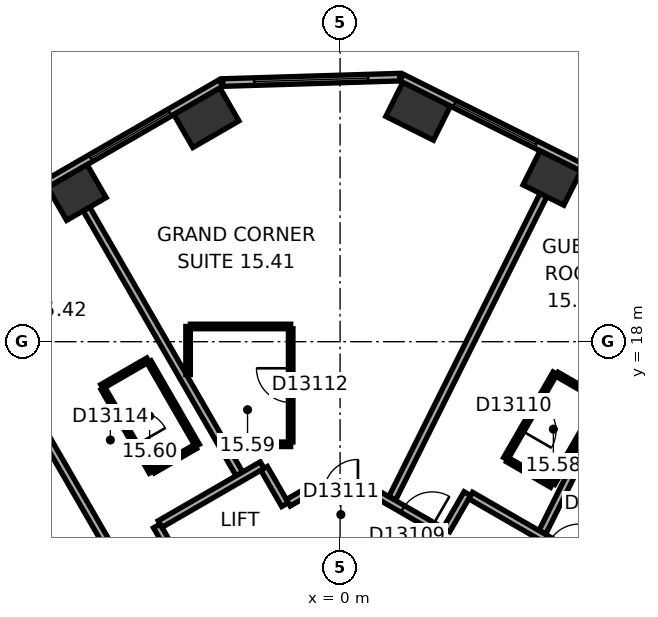
"""IFC4 building model, lengths in metres.
Left out: names, types, materials, properties, quantities, classifications, styles, units other than length and angle.
Written with IfcOpenShell. Run it as: python <this file> out.ifc"""

import sys

from ifc_helpers import new_model, si_unit, direction, frame, frame_2d, origin, origin_2d, place, context, subcontext, project, spatial, rectangle, extrude, element, fill, save


model = new_model("IFC4")
c1 = context("Model", 3, precision=1e-05, world=origin(), true_north=direction((0.0, 1.0)))
c2 = subcontext(c1, "Body", "Model", "MODEL_VIEW")
j1 = project(units=[si_unit("LENGTHUNIT", "METRE"), si_unit("PLANEANGLEUNIT", "RADIAN")], contexts=[c1])
p1 = place(None, origin())
s1 = spatial("IfcSite", under=j1, at=p1, CompositionType="ELEMENT")
p2 = place(p1, origin())
s2 = spatial("IfcBuilding", under=s1, at=p2, CompositionType="ELEMENT")
p3 = place(p2, frame((0.0, 0.0, 70.4)))
s3 = spatial("IfcBuildingStorey", under=s2, at=p3, CompositionType="ELEMENT", Elevation=70.4)
p4 = place(p3, frame((5.574, 22.306, 0.0), z_axis=(0.0, 0.0, 1.0), x_axis=(-0.894934361602, 0.44619781311, 0.0)))
e1 = element("IfcColumn", 1, at=p4, inside=s3, PredefinedType="COLUMN", context=c2, shape_type="SweptSolid", body=[
    extrude(rectangle(XDim=1.2, YDim=1.0, at=origin_2d()), origin(), (0.0, 0.0, 1.0), 3.3),
])
for number, where, z_axis, x_axis in (
    (2, (2.053, 24.062, 0.0), (0.0, 0.0, 1.0), (-0.895, 0.446, 0.0)),
    (3, (-3.518, 23.892, 0.0), (0.0, 0.0, 1.0), (-0.866, -0.5, 0.0)),
):
    element("IfcColumn", number, at=place(p3, frame(where, z_axis=z_axis, x_axis=x_axis)), inside=s3, PredefinedType="COLUMN", context=c2, shape_type="SweptSolid", body=[
        extrude(rectangle(XDim=1.4, YDim=1.0, at=origin_2d()), origin(), (0.0, 0.0, 1.0), 3.3),
    ])
p5 = place(p3, frame((-6.926, 21.925, 0.0), z_axis=(0.0, 0.0, 1.0), x_axis=(-0.866025403784, -0.5, 0.0)))
e4 = element("IfcColumn", 4, at=p5, inside=s3, PredefinedType="COLUMN", context=c2, shape_type="SweptSolid", body=[
    extrude(rectangle(XDim=1.2, YDim=1.0, at=origin_2d()), origin(), (0.0, 0.0, 1.0), 3.3),
])
p6 = place(p3, frame((20.63, 15.47, 0.0), z_axis=(0.0, 0.0, 1.0), x_axis=(-0.894934518609, 0.446197498203, 0.0)))
e5 = element("IfcWall", 5, at=p6, inside=s3, PredefinedType="STANDARD", context=c2, shape_type="SweptSolid", body=[
    extrude(rectangle(XDim=21.246, YDim=0.2, at=frame_2d((10.623, 0.0))), origin(), (0.0, 0.0, 1.0), 3.3),
])
p7 = place(p6, frame((1.553, 0.0, 0.8)))
e6 = element("IfcOpeningElement", 6, at=p7, cuts=e5, PredefinedType="OPENING", context=c2, shape_type="SweptSolid", body=[
    extrude(rectangle(XDim=2.4, YDim=1.7, at=frame_2d((1.2, 0.85))), frame((0.0, 0.11, 0.0), z_axis=(0.0, -1.0, 0.0), x_axis=(1.0, 0.0, 0.0)), (0.0, 0.0, 1.0), 0.22),
])
p8 = place(p6, frame((5.488, 0.0, 0.8)))
e7 = element("IfcOpeningElement", 7, at=p8, cuts=e5, PredefinedType="OPENING", context=c2, shape_type="SweptSolid", body=[
    extrude(rectangle(XDim=2.4, YDim=1.7, at=frame_2d((1.2, 0.85))), frame((0.0, 0.11, 0.0), z_axis=(0.0, -1.0, 0.0), x_axis=(1.0, 0.0, 0.0)), (0.0, 0.0, 1.0), 0.22),
])
p9 = place(p6, frame((9.422, 0.0, 0.8)))
e8 = element("IfcOpeningElement", 8, at=p9, cuts=e5, PredefinedType="OPENING", context=c2, shape_type="SweptSolid", body=[
    extrude(rectangle(XDim=2.4, YDim=1.7, at=frame_2d((1.2, 0.85))), frame((0.0, 0.11, 0.0), z_axis=(0.0, -1.0, 0.0), x_axis=(1.0, 0.0, 0.0)), (0.0, 0.0, 1.0), 0.22),
])
p10 = place(p6, frame((13.357, 0.0, 0.8)))
e9 = element("IfcOpeningElement", 9, at=p10, cuts=e5, PredefinedType="OPENING", context=c2, shape_type="SweptSolid", body=[
    extrude(rectangle(XDim=2.4, YDim=1.7, at=frame_2d((1.2, 0.85))), frame((0.0, 0.11, 0.0), z_axis=(0.0, -1.0, 0.0), x_axis=(1.0, 0.0, 0.0)), (0.0, 0.0, 1.0), 0.22),
])
p11 = place(p6, frame((17.292, 0.0, 0.8)))
e10 = element("IfcOpeningElement", 10, at=p11, cuts=e5, PredefinedType="OPENING", context=c2, shape_type="SweptSolid", body=[
    extrude(rectangle(XDim=2.4, YDim=1.7, at=frame_2d((1.2, 0.85))), frame((0.0, 0.11, 0.0), z_axis=(0.0, -1.0, 0.0), x_axis=(1.0, 0.0, 0.0)), (0.0, 0.0, 1.0), 0.22),
])
p12 = place(p3, frame((1.568, 24.961, 0.0), z_axis=(0.0, 0.0, 1.0), x_axis=(-0.999533359013, -0.030546099927, 0.0)))
e11 = element("IfcWall", 11, at=p12, inside=s3, PredefinedType="STANDARD", context=c2, shape_type="SweptSolid", body=[
    extrude(rectangle(XDim=4.66, YDim=0.2, at=frame_2d((2.33, 0.0))), origin(), (0.0, 0.0, 1.0), 3.3),
])
p13 = place(p12, frame((0.83, 0.0, 0.8)))
e12 = element("IfcOpeningElement", 12, at=p13, cuts=e11, PredefinedType="OPENING", context=c2, shape_type="SweptSolid", body=[
    extrude(rectangle(XDim=3.0, YDim=1.7, at=frame_2d((1.5, 0.85))), frame((0.0, 0.11, 0.0), z_axis=(0.0, -1.0, 0.0), x_axis=(1.0, 0.0, 0.0)), (0.0, 0.0, 1.0), 0.22),
])
p14 = place(p3, frame((-3.136, 24.805, 0.0), z_axis=(0.0, 0.0, 1.0), x_axis=(-0.866028291626, -0.499994998079, 0.0)))
e13 = element("IfcWall", 13, at=p14, inside=s3, PredefinedType="STANDARD", context=c2, shape_type="SweptSolid", body=[
    extrude(rectangle(XDim=21.246, YDim=0.2, at=frame_2d((10.623, 0.0))), origin(), (0.0, 0.0, 1.0), 3.3),
])
p15 = place(p14, frame((1.555, 0.0, 0.8)))
e14 = element("IfcOpeningElement", 14, at=p15, cuts=e13, PredefinedType="OPENING", context=c2, shape_type="SweptSolid", body=[
    extrude(rectangle(XDim=2.4, YDim=1.7, at=frame_2d((1.2, 0.85))), frame((0.0, 0.11, 0.0), z_axis=(0.0, -1.0, 0.0), x_axis=(1.0, 0.0, 0.0)), (0.0, 0.0, 1.0), 0.22),
])
p16 = place(p14, frame((5.489, 0.0, 0.8)))
e15 = element("IfcOpeningElement", 15, at=p16, cuts=e13, PredefinedType="OPENING", context=c2, shape_type="SweptSolid", body=[
    extrude(rectangle(XDim=2.4, YDim=1.7, at=frame_2d((1.2, 0.85))), frame((0.0, 0.11, 0.0), z_axis=(0.0, -1.0, 0.0), x_axis=(1.0, 0.0, 0.0)), (0.0, 0.0, 1.0), 0.22),
])
p17 = place(p14, frame((9.424, 0.0, 0.8)))
e16 = element("IfcOpeningElement", 16, at=p17, cuts=e13, PredefinedType="OPENING", context=c2, shape_type="SweptSolid", body=[
    extrude(rectangle(XDim=2.4, YDim=1.7, at=frame_2d((1.2, 0.85))), frame((0.0, 0.11, 0.0), z_axis=(0.0, -1.0, 0.0), x_axis=(1.0, 0.0, 0.0)), (0.0, 0.0, 1.0), 0.22),
])
p18 = place(p14, frame((13.358, 0.0, 0.8)))
e17 = element("IfcOpeningElement", 17, at=p18, cuts=e13, PredefinedType="OPENING", context=c2, shape_type="SweptSolid", body=[
    extrude(rectangle(XDim=2.4, YDim=1.7, at=frame_2d((1.2, 0.85))), frame((0.0, 0.11, 0.0), z_axis=(0.0, -1.0, 0.0), x_axis=(1.0, 0.0, 0.0)), (0.0, 0.0, 1.0), 0.22),
])
p19 = place(p14, frame((17.293, 0.0, 0.8)))
e18 = element("IfcOpeningElement", 18, at=p19, cuts=e13, PredefinedType="OPENING", context=c2, shape_type="SweptSolid", body=[
    extrude(rectangle(XDim=2.4, YDim=1.7, at=frame_2d((1.2, 0.85))), frame((0.0, 0.11, 0.0), z_axis=(0.0, -1.0, 0.0), x_axis=(1.0, 0.0, 0.0)), (0.0, 0.0, 1.0), 0.22),
])
p20 = place(p3, frame((-10.083, 19.524, 0.0), z_axis=(0.0, 0.0, 1.0), x_axis=(0.499999662836, -0.866025598446, 0.0)))
e19 = element("IfcWall", 19, at=p20, inside=s3, PredefinedType="PARTITIONING", context=c2, shape_type="SweptSolid", body=[
    extrude(rectangle(XDim=9.25, YDim=0.2, at=frame_2d((4.625, 0.0))), origin(), (0.0, 0.0, 1.0), 2.6),
])
p21 = place(p3, frame((-6.676, 21.492, 0.0), z_axis=(0.0, 0.0, 1.0), x_axis=(0.500011263043, -0.866018900966, 0.0)))
e20 = element("IfcWall", 20, at=p21, inside=s3, PredefinedType="PARTITIONING", context=c2, shape_type="SweptSolid", body=[
    extrude(rectangle(XDim=8.049, YDim=0.2, at=frame_2d((4.024, 0.0))), origin(), (0.0, 0.0, 1.0), 3.05),
])
p22 = place(p3, frame((-6.268, 16.82, 0.0), z_axis=(0.0, 0.0, 1.0), x_axis=(0.866002662425, 0.500039387122, 0.0)))
e21 = element("IfcWall", 21, at=p22, inside=s3, PredefinedType="PARTITIONING", context=c2, shape_type="SweptSolid", body=[
    extrude(rectangle(XDim=1.4, YDim=0.12, at=frame_2d((0.7, 0.0))), origin(), (0.0, 0.0, 1.0), 3.05),
])
p23 = place(p3, frame((-5.026, 17.469, 0.0), z_axis=(0.0, 0.0, 1.0), x_axis=(0.500005339912, -0.866022320763, 0.0)))
e22 = element("IfcWall", 22, at=p23, inside=s3, PredefinedType="PARTITIONING", context=c2, shape_type="SweptSolid", body=[
    extrude(rectangle(XDim=2.54, YDim=0.12, at=frame_2d((1.27, 0.0))), origin(), (0.0, 0.0, 1.0), 3.05),
])
p24 = place(p3, frame((-4.968, 14.569, 0.0), z_axis=(0.0, 0.0, 1.0), x_axis=(-0.500046963369, 0.865998287773, 0.0)))
e23 = element("IfcWall", 23, at=p24, inside=s3, PredefinedType="PARTITIONING", context=c2, shape_type="SweptSolid", body=[
    extrude(rectangle(XDim=2.54, YDim=0.12, at=frame_2d((1.27, 0.0))), origin(), (0.0, 0.0, 1.0), 3.05),
])
p25 = place(p24, frame((0.82, 0.0, 0.0)))
e24 = element("IfcOpeningElement", 24, at=p25, cuts=e23, PredefinedType="OPENING", context=c2, shape_type="SweptSolid", body=[
    extrude(rectangle(XDim=0.9, YDim=2.1, at=frame_2d((0.45, 1.05))), frame((0.0, 0.07, 0.0), z_axis=(0.0, -1.0, 0.0), x_axis=(1.0, 0.0, 0.0)), (0.0, 0.0, 1.0), 0.14),
])
p26 = place(p3, frame((-4.823, 13.152, 0.0), z_axis=(0.0, 0.0, 1.0), x_axis=(0.499986357472, -0.866033280158, 0.0)))
e25 = element("IfcWall", 25, at=p26, inside=s3, PredefinedType="PARTITIONING", context=c2, shape_type="SweptSolid", body=[
    extrude(rectangle(XDim=1.201, YDim=0.2, at=frame_2d((0.601, 0.0))), origin(), (0.0, 0.0, 1.0), 3.05),
])
p27 = place(p3, frame((-4.0, 17.137, 0.0), z_axis=(0.0, 0.0, 1.0), x_axis=(0.0, 1.0, 0.0)))
e26 = element("IfcWall", 26, at=p27, inside=s3, PredefinedType="PARTITIONING", context=c2, shape_type="SweptSolid", body=[
    extrude(rectangle(XDim=1.263, YDim=0.12, at=frame_2d((0.632, 0.0))), origin(), (0.0, 0.0, 1.0), 3.05),
])
p28 = place(p3, frame((-3.94, 18.401, 0.0), z_axis=(0.0, 0.0, 1.0), x_axis=(1.0, 0.0, 0.0)))
e27 = element("IfcWall", 27, at=p28, inside=s3, PredefinedType="PARTITIONING", context=c2, shape_type="SweptSolid", body=[
    extrude(rectangle(XDim=2.64, YDim=0.12, at=frame_2d((1.32, 0.0))), origin(), (0.0, 0.0, 1.0), 3.05),
])
p29 = place(p3, frame((-3.808, 15.239, 0.0), z_axis=(0.0, 0.0, 1.0), x_axis=(-0.866087136806, -0.499893060024, 0.0)))
e28 = element("IfcWall", 28, at=p29, inside=s3, PredefinedType="PARTITIONING", context=c2, shape_type="SweptSolid", body=[
    extrude(rectangle(XDim=1.28, YDim=0.12, at=frame_2d((0.64, 0.0))), origin(), (0.0, 0.0, 1.0), 3.05),
])
p30 = place(p3, frame((-2.05, 14.752, 0.0), z_axis=(0.0, 0.0, 1.0), x_axis=(-0.866030936828, -0.499990416364, 0.0)))
e29 = element("IfcWall", 29, at=p30, inside=s3, PredefinedType="PARTITIONING", context=c2, shape_type="SweptSolid", body=[
    extrude(rectangle(XDim=3.102, YDim=0.2, at=frame_2d((1.551, 0.0))), origin(), (0.0, 0.0, 1.0), 3.05),
])
p31 = place(p3, frame((-1.449, 13.712, 0.0), z_axis=(0.0, 0.0, 1.0), x_axis=(-0.499978356969, 0.866037899034, 0.0)))
e30 = element("IfcWall", 30, at=p31, inside=s3, PredefinedType="PARTITIONING", context=c2, shape_type="SweptSolid", body=[
    extrude(rectangle(XDim=1.101, YDim=0.2, at=frame_2d((0.551, 0.0))), origin(), (0.0, 0.0, 1.0), 3.05),
])
p32 = place(p3, frame((-1.3, 15.301, 0.0), z_axis=(0.0, 0.0, 1.0), x_axis=(-1.0, 0.0, 0.0)))
e31 = element("IfcWall", 31, at=p32, inside=s3, PredefinedType="PARTITIONING", context=c2, shape_type="SweptSolid", body=[
    extrude(rectangle(XDim=1.661, YDim=0.12, at=frame_2d((0.831, 0.0))), origin(), (0.0, 0.0, 1.0), 3.05),
])
p33 = place(p3, frame((-1.3, 18.341, 0.0), z_axis=(0.0, 0.0, 1.0), x_axis=(0.0, -1.0, 0.0)))
e32 = element("IfcWall", 32, at=p33, inside=s3, PredefinedType="PARTITIONING", context=c2, shape_type="SweptSolid", body=[
    extrude(rectangle(XDim=2.98, YDim=0.12, at=frame_2d((1.49, 0.0))), origin(), (0.0, 0.0, 1.0), 3.05),
])
p34 = place(p33, frame((1.04, 0.0, 0.0)))
e33 = element("IfcOpeningElement", 33, at=p34, cuts=e32, PredefinedType="OPENING", context=c2, shape_type="SweptSolid", body=[
    extrude(rectangle(XDim=0.9, YDim=2.1, at=frame_2d((0.45, 1.05))), frame((0.0, 0.07, 0.0), z_axis=(0.0, -1.0, 0.0), x_axis=(1.0, 0.0, 0.0)), (0.0, 0.0, 1.0), 0.14),
])
p35 = place(p3, frame((-0.95, 14.001, 0.0), z_axis=(0.0, 0.0, 1.0), x_axis=(-0.86609177584, -0.499885022602, 0.0)))
e34 = element("IfcWall", 34, at=p35, inside=s3, PredefinedType="PARTITIONING", context=c2, shape_type="SweptSolid", body=[
    extrude(rectangle(XDim=0.477, YDim=0.2, at=frame_2d((0.238, 0.0))), origin(), (0.0, 0.0, 1.0), 3.05),
])
p36 = place(p3, frame((0.95, 14.001, 0.0), z_axis=(0.0, 0.0, 1.0), x_axis=(-1.0, 0.0, 0.0)))
e35 = element("IfcWall", 35, at=p36, inside=s3, PredefinedType="PARTITIONING", context=c2, shape_type="SweptSolid", body=[
    extrude(rectangle(XDim=1.86, YDim=0.2, at=frame_2d((0.93, 0.0))), origin(), (0.0, 0.0, 1.0), 3.05),
])
p37 = place(p36, frame((0.48, 0.0, 0.0)))
e36 = element("IfcOpeningElement", 36, at=p37, cuts=e35, PredefinedType="OPENING", context=c2, shape_type="SweptSolid", body=[
    extrude(rectangle(XDim=0.9, YDim=2.1, at=frame_2d((0.45, 1.05))), frame((0.0, 0.11, 0.0), z_axis=(0.0, -1.0, 0.0), x_axis=(1.0, 0.0, 0.0)), (0.0, 0.0, 1.0), 0.22),
])
p38 = place(p3, frame((2.748, 12.962, 0.0), z_axis=(0.0, 0.0, 1.0), x_axis=(-0.866013897511, 0.50001992892, 0.0)))
e37 = element("IfcWall", 37, at=p38, inside=s3, PredefinedType="PARTITIONING", context=c2, shape_type="SweptSolid", body=[
    extrude(rectangle(XDim=2.037, YDim=0.2, at=frame_2d((1.018, 0.0))), origin(), (0.0, 0.0, 1.0), 3.05),
])
p39 = place(p38, frame((0.372, 0.0, 0.0)))
e38 = element("IfcOpeningElement", 38, at=p39, cuts=e37, PredefinedType="OPENING", context=c2, shape_type="SweptSolid", body=[
    extrude(rectangle(XDim=0.9, YDim=2.1, at=frame_2d((0.45, 1.05))), frame((0.0, 0.11, 0.0), z_axis=(0.0, -1.0, 0.0), x_axis=(1.0, 0.0, 0.0)), (0.0, 0.0, 1.0), 0.22),
])
p40 = place(p3, frame((3.349, 14.002, 0.0), z_axis=(0.0, 0.0, 1.0), x_axis=(-0.500074377092, -0.865982457891, 0.0)))
e39 = element("IfcWall", 39, at=p40, inside=s3, PredefinedType="PARTITIONING", context=c2, shape_type="SweptSolid", body=[
    extrude(rectangle(XDim=1.101, YDim=0.2, at=frame_2d((0.55, 0.0))), origin(), (0.0, 0.0, 1.0), 3.05),
])
p41 = place(p3, frame((4.356, 14.922, 0.0), z_axis=(0.0, 0.0, 1.0), x_axis=(0.499936506574, 0.866062058628, 0.0)))
e40 = element("IfcWall", 40, at=p41, inside=s3, PredefinedType="PARTITIONING", context=c2, shape_type="SweptSolid", body=[
    extrude(rectangle(XDim=2.6, YDim=0.12, at=frame_2d((1.3, 0.0))), origin(), (0.0, 0.0, 1.0), 3.05),
])
p42 = place(p41, frame((0.85, 0.0, 0.0)))
e41 = element("IfcOpeningElement", 41, at=p42, cuts=e40, PredefinedType="OPENING", context=c2, shape_type="SweptSolid", body=[
    extrude(rectangle(XDim=0.9, YDim=2.1, at=frame_2d((0.45, 1.05))), frame((0.0, 0.07, 0.0), z_axis=(0.0, -1.0, 0.0), x_axis=(1.0, 0.0, 0.0)), (0.0, 0.0, 1.0), 0.14),
])
p43 = place(p3, frame((5.351, 21.859, 0.0), z_axis=(0.0, 0.0, 1.0), x_axis=(-0.446205309328, -0.894930624086, 0.0)))
e42 = element("IfcWall", 42, at=p43, inside=s3, PredefinedType="PARTITIONING", context=c2, shape_type="SweptSolid", body=[
    extrude(rectangle(XDim=8.913, YDim=0.2, at=frame_2d((4.457, 0.0))), origin(), (0.0, 0.0, 1.0), 2.6),
])
p44 = place(p3, frame((5.569, 14.222, 0.0), z_axis=(0.0, 0.0, 1.0), x_axis=(-0.866036909293, 0.499980071345, 0.0)))
e43 = element("IfcWall", 43, at=p44, inside=s3, PredefinedType="PARTITIONING", context=c2, shape_type="SweptSolid", body=[
    extrude(rectangle(XDim=1.34, YDim=0.12, at=frame_2d((0.67, 0.0))), origin(), (0.0, 0.0, 1.0), 3.05),
])
p45 = place(p3, frame((5.708, 17.144, 0.0), z_axis=(0.0, 0.0, 1.0), x_axis=(0.866082447003, -0.499901185229, 0.0)))
e44 = element("IfcWall", 44, at=p45, inside=s3, PredefinedType="PARTITIONING", context=c2, shape_type="SweptSolid", body=[
    extrude(rectangle(XDim=1.34, YDim=0.12, at=frame_2d((0.67, 0.0))), origin(), (0.0, 0.0, 1.0), 3.05),
])
p46 = place(p3, frame((6.839, 16.422, 0.0), z_axis=(0.0, 0.0, 1.0), x_axis=(-0.50000366821, -0.866023285932, 0.0)))
e45 = element("IfcWall", 45, at=p46, inside=s3, PredefinedType="PARTITIONING", context=c2, shape_type="SweptSolid", body=[
    extrude(rectangle(XDim=2.48, YDim=0.12, at=frame_2d((1.24, 0.0))), origin(), (0.0, 0.0, 1.0), 3.05),
])
p47 = place(p3, frame((8.872, 20.104, 0.0), z_axis=(0.0, 0.0, 1.0), x_axis=(-0.446218378653, -0.894924107706, 0.0)))
e46 = element("IfcWall", 46, at=p47, inside=s3, PredefinedType="PARTITIONING", context=c2, shape_type="SweptSolid", body=[
    extrude(rectangle(XDim=7.95, YDim=0.2, at=frame_2d((3.975, 0.0))), origin(), (0.0, 0.0, 1.0), 3.05),
])
p48 = place(p3, frame((10.885, 9.652, 0.0), z_axis=(0.0, 0.0, 1.0), x_axis=(-0.866033868542, 0.499985338323, 0.0)))
e47 = element("IfcWall", 47, at=p48, inside=s3, PredefinedType="PARTITIONING", context=c2, shape_type="SweptSolid", body=[
    extrude(rectangle(XDim=8.602, YDim=0.2, at=frame_2d((4.301, 0.0))), origin(), (0.0, 0.0, 1.0), 3.05),
])
p49 = place(p48, frame((5.302, 0.0, 0.0)))
e48 = element("IfcOpeningElement", 48, at=p49, cuts=e47, PredefinedType="OPENING", context=c2, shape_type="SweptSolid", body=[
    extrude(rectangle(XDim=0.9, YDim=2.1, at=frame_2d((0.45, 1.05))), frame((0.0, 0.11, 0.0), z_axis=(0.0, -1.0, 0.0), x_axis=(1.0, 0.0, 0.0)), (0.0, 0.0, 1.0), 0.22),
])
p50 = place(p11, origin())
e49 = element("IfcWindow", 49, at=p50, inside=s3, PartitioningType="SINGLE_PANEL", PredefinedType="WINDOW", context=c2, shape_type="SweptSolid", body=[
    extrude(rectangle(XDim=2.4, YDim=1.7, at=frame_2d((1.2, 0.85))), frame((0.0, 0.03, 0.0), z_axis=(0.0, -1.0, 0.0), x_axis=(1.0, 0.0, 0.0)), (0.0, 0.0, 1.0), 0.06),
])
fill(e10, e49)
p51 = place(p13, origin())
e50 = element("IfcWindow", 50, at=p51, inside=s3, PartitioningType="SINGLE_PANEL", PredefinedType="WINDOW", context=c2, shape_type="SweptSolid", body=[
    extrude(rectangle(XDim=3.0, YDim=1.7, at=frame_2d((1.5, 0.85))), frame((0.0, 0.03, 0.0), z_axis=(0.0, -1.0, 0.0), x_axis=(1.0, 0.0, 0.0)), (0.0, 0.0, 1.0), 0.06),
])
fill(e12, e50)
p52 = place(p15, origin())
e51 = element("IfcWindow", 51, at=p52, inside=s3, PartitioningType="SINGLE_PANEL", PredefinedType="WINDOW", context=c2, shape_type="SweptSolid", body=[
    extrude(rectangle(XDim=2.4, YDim=1.7, at=frame_2d((1.2, 0.85))), frame((0.0, 0.03, 0.0), z_axis=(0.0, -1.0, 0.0), x_axis=(1.0, 0.0, 0.0)), (0.0, 0.0, 1.0), 0.06),
])
fill(e14, e51)
p53 = place(p39, origin())
e52 = element("IfcDoor", 52, at=p53, inside=s3, OperationType="SINGLE_SWING_LEFT", PredefinedType="DOOR", context=c2, shape_type="SweptSolid", body=[
    extrude(rectangle(XDim=0.9, YDim=2.1, at=frame_2d((0.45, 1.05))), frame((0.0, 0.025, 0.0), z_axis=(0.0, -1.0, 0.0), x_axis=(1.0, 0.0, 0.0)), (0.0, 0.0, 1.0), 0.05),
])
fill(e38, e52)
p54 = place(p42, origin())
e53 = element("IfcDoor", 53, at=p54, inside=s3, OperationType="SINGLE_SWING_LEFT", PredefinedType="DOOR", context=c2, shape_type="SweptSolid", body=[
    extrude(rectangle(XDim=0.9, YDim=2.1, at=frame_2d((0.45, 1.05))), frame((0.0, 0.025, 0.0), z_axis=(0.0, -1.0, 0.0), x_axis=(1.0, 0.0, 0.0)), (0.0, 0.0, 1.0), 0.05),
])
fill(e41, e53)
p55 = place(p37, origin())
e54 = element("IfcDoor", 54, at=p55, inside=s3, OperationType="SINGLE_SWING_LEFT", PredefinedType="DOOR", context=c2, shape_type="SweptSolid", body=[
    extrude(rectangle(XDim=0.9, YDim=2.1, at=frame_2d((0.45, 1.05))), frame((0.0, 0.025, 0.0), z_axis=(0.0, -1.0, 0.0), x_axis=(1.0, 0.0, 0.0)), (0.0, 0.0, 1.0), 0.05),
])
fill(e36, e54)
p56 = place(p34, origin())
e55 = element("IfcDoor", 55, at=p56, inside=s3, OperationType="SINGLE_SWING_LEFT", PredefinedType="DOOR", context=c2, shape_type="SweptSolid", body=[
    extrude(rectangle(XDim=0.9, YDim=2.1, at=frame_2d((0.45, 1.05))), frame((0.0, 0.025, 0.0), z_axis=(0.0, -1.0, 0.0), x_axis=(1.0, 0.0, 0.0)), (0.0, 0.0, 1.0), 0.05),
])
fill(e33, e55)
p57 = place(p25, origin())
e56 = element("IfcDoor", 56, at=p57, inside=s3, OperationType="SINGLE_SWING_LEFT", PredefinedType="DOOR", context=c2, shape_type="SweptSolid", body=[
    extrude(rectangle(XDim=0.9, YDim=2.1, at=frame_2d((0.45, 1.05))), frame((0.0, 0.025, 0.0), z_axis=(0.0, -1.0, 0.0), x_axis=(1.0, 0.0, 0.0)), (0.0, 0.0, 1.0), 0.05),
])
fill(e24, e56)
save(model, sys.argv[1])
